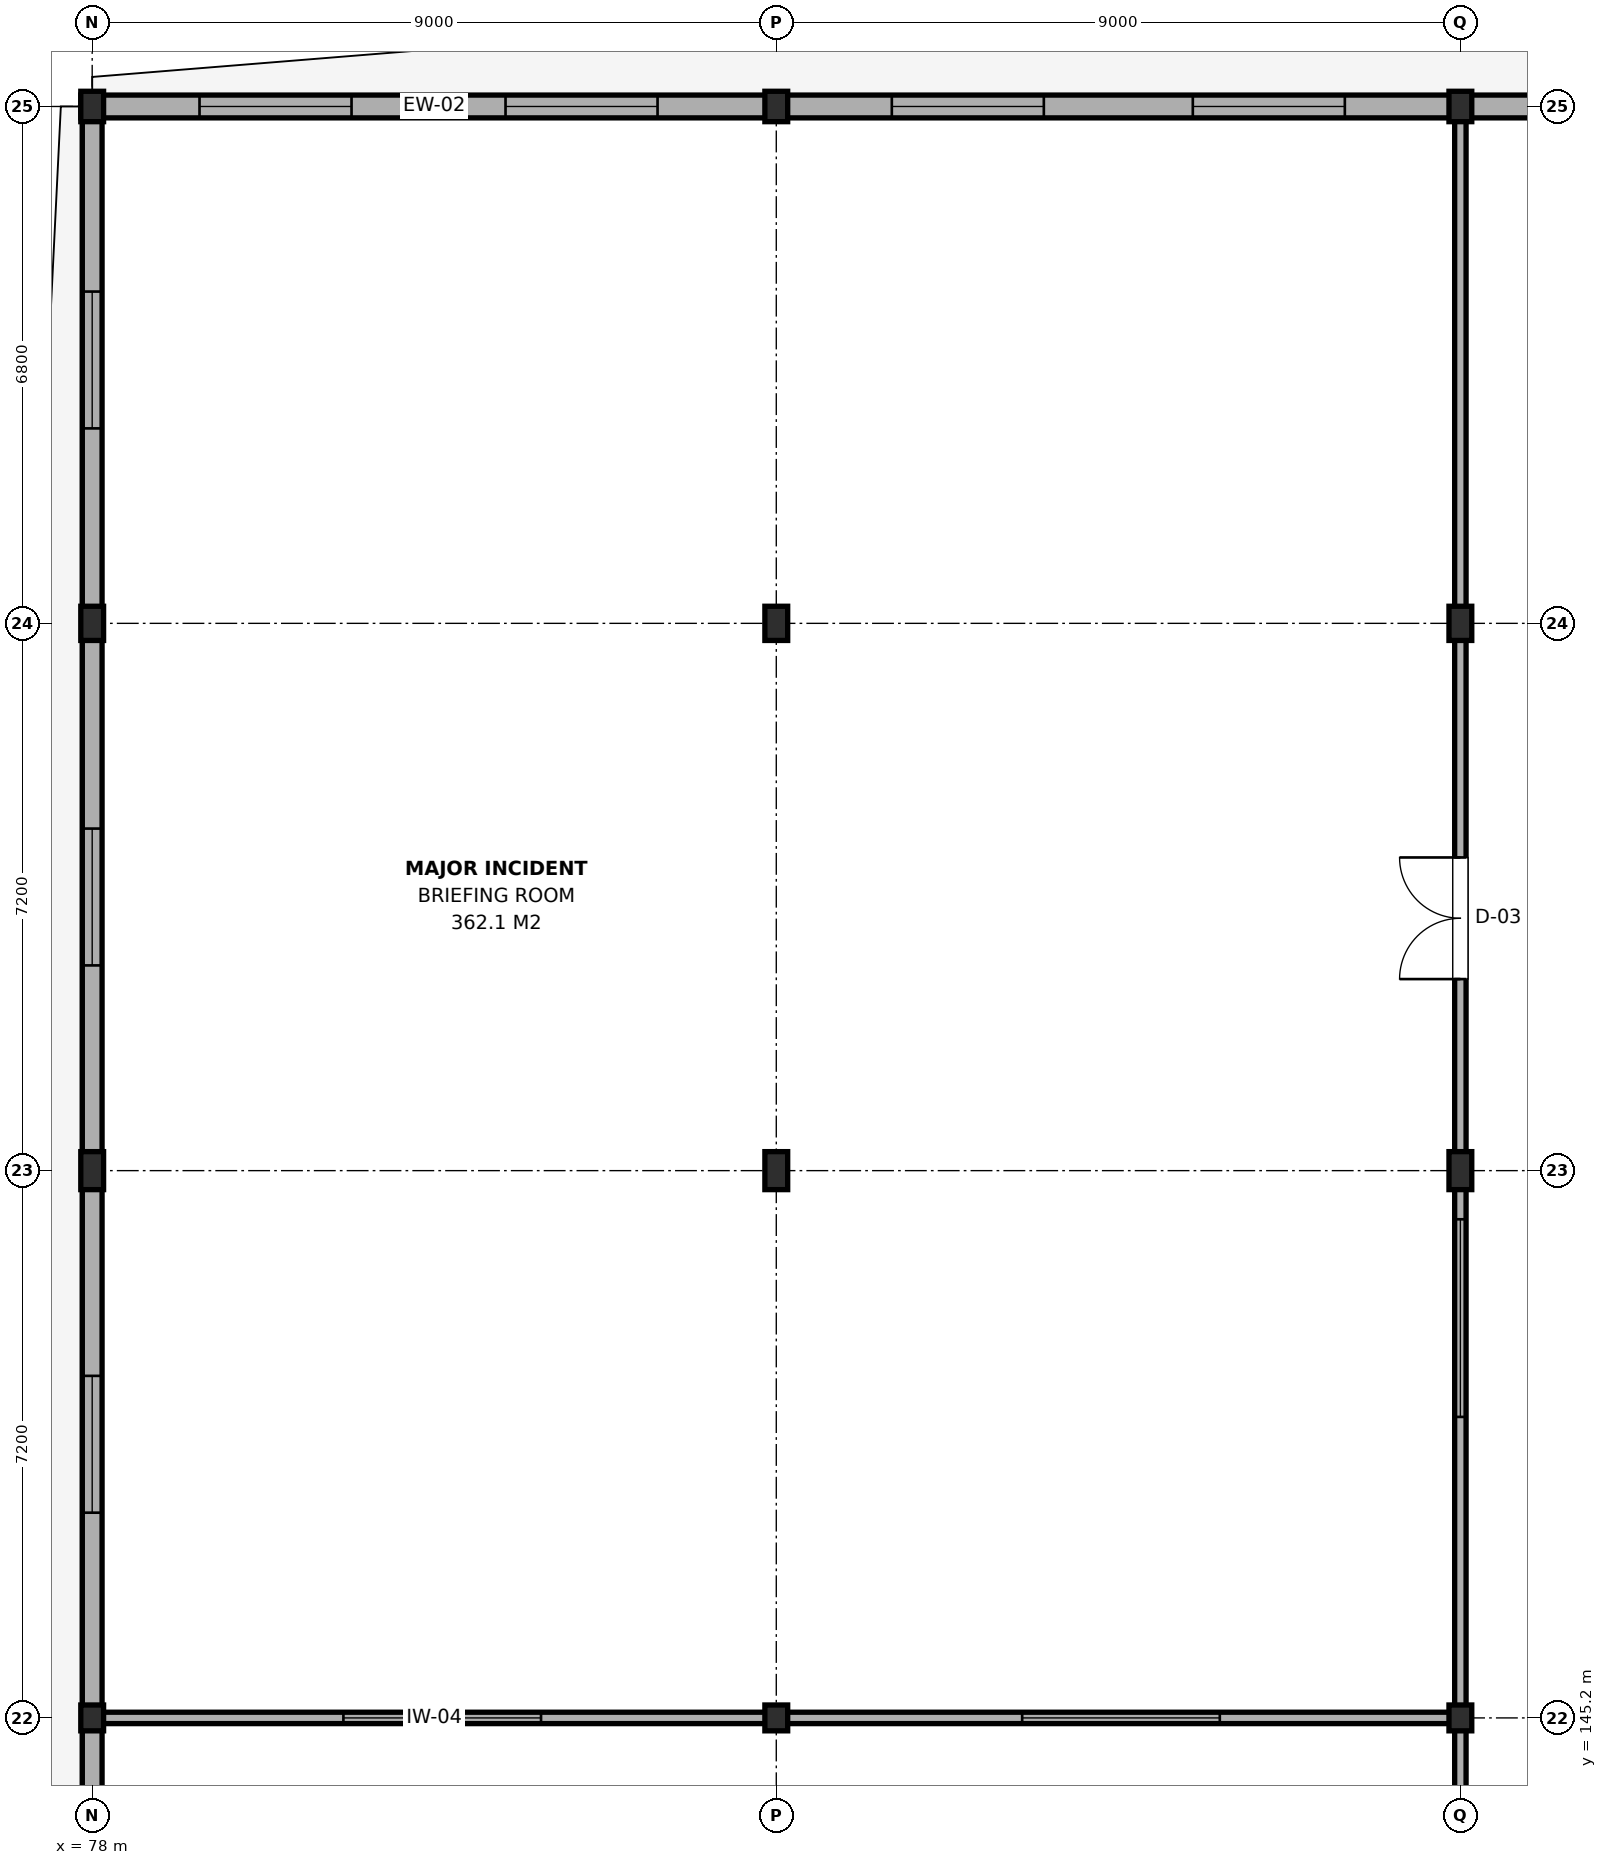
"""IFC4 building model, lengths in metres.
Left out: names, types, materials, properties, quantities, classifications, styles, units other than length and angle.
Written with IfcOpenShell. Run it as: python <this file> out.ifc"""

import sys

from ifc_helpers import new_model, si_unit, direction, frame, frame_2d, origin, origin_2d, place, context, subcontext, project, spatial, rectangle, i_section, extrude, element, fill, save


model = new_model("IFC4")
c1 = context("Model", 3, precision=1e-05, world=origin(), true_north=direction((0.0, 1.0)))
c2 = subcontext(c1, "Body", "Model", "MODEL_VIEW")
j1 = project(units=[si_unit("LENGTHUNIT", "METRE"), si_unit("PLANEANGLEUNIT", "RADIAN")], contexts=[c1])
p1 = place(None, origin())
s1 = spatial("IfcSite", under=j1, at=p1, CompositionType="ELEMENT")
p2 = place(p1, origin())
s2 = spatial("IfcBuilding", under=s1, at=p2, CompositionType="ELEMENT")
p3 = place(p2, frame((0.0, 0.0, 9.0)))
s3 = spatial("IfcBuildingStorey", under=s2, at=p3, CompositionType="ELEMENT", Elevation=9.0)
p4 = place(p3, frame((78.0, 145.2, 0.0), z_axis=(0.0, 0.0, 1.0), x_axis=(1.0, 0.0, 0.0)))
e1 = element("IfcColumn", 1, at=p4, inside=s3, PredefinedType="COLUMN", context=c2, shape_type="SweptSolid", body=[
    extrude(i_section(OverallWidth=0.3, OverallDepth=0.34, WebThickness=0.012, FlangeThickness=0.021, FilletRadius=0.027, at=origin_2d()), origin(), (0.0, 0.0, 1.0), 4.2),
])
p5 = place(p3, frame((78.0, 152.4, 0.0), z_axis=(0.0, 0.0, 1.0), x_axis=(1.0, 0.0, 0.0)))
e2 = element("IfcColumn", 2, at=p5, inside=s3, PredefinedType="COLUMN", context=c2, shape_type="SweptSolid", body=[
    extrude(i_section(OverallWidth=0.3, OverallDepth=0.5, WebThickness=0.014, FlangeThickness=0.028, FilletRadius=0.027, at=origin_2d()), origin(), (0.0, 0.0, 1.0), 4.2),
])
p6 = place(p3, frame((78.0, 159.6, 0.0), z_axis=(0.0, 0.0, 1.0), x_axis=(1.0, 0.0, 0.0)))
e3 = element("IfcColumn", 3, at=p6, inside=s3, PredefinedType="COLUMN", context=c2, shape_type="SweptSolid", body=[
    extrude(i_section(OverallWidth=0.3, OverallDepth=0.45, WebThickness=0.014, FlangeThickness=0.026, FilletRadius=0.027, at=origin_2d()), origin(), (0.0, 0.0, 1.0), 4.2),
])
p7 = place(p3, frame((78.0, 166.4, 0.0), z_axis=(0.0, 0.0, 1.0), x_axis=(1.0, 0.0, 0.0)))
e4 = element("IfcColumn", 4, at=p7, inside=s3, PredefinedType="COLUMN", context=c2, shape_type="SweptSolid", body=[
    extrude(i_section(OverallWidth=0.3, OverallDepth=0.4, WebThickness=0.013, FlangeThickness=0.024, FilletRadius=0.027, at=origin_2d()), origin(), (0.0, 0.0, 1.0), 4.2),
])
p8 = place(p3, frame((87.0, 145.2, 0.0), z_axis=(0.0, 0.0, 1.0), x_axis=(1.0, 0.0, 0.0)))
e5 = element("IfcColumn", 5, at=p8, inside=s3, PredefinedType="COLUMN", context=c2, shape_type="SweptSolid", body=[
    extrude(i_section(OverallWidth=0.3, OverallDepth=0.34, WebThickness=0.012, FlangeThickness=0.021, FilletRadius=0.027, at=origin_2d()), origin(), (0.0, 0.0, 1.0), 4.2),
])
p9 = place(p3, frame((87.0, 152.4, 0.0), z_axis=(0.0, 0.0, 1.0), x_axis=(1.0, 0.0, 0.0)))
e6 = element("IfcColumn", 6, at=p9, inside=s3, PredefinedType="COLUMN", context=c2, shape_type="SweptSolid", body=[
    extrude(i_section(OverallWidth=0.3, OverallDepth=0.5, WebThickness=0.014, FlangeThickness=0.028, FilletRadius=0.027, at=origin_2d()), origin(), (0.0, 0.0, 1.0), 4.2),
])
p10 = place(p3, frame((87.0, 159.6, 0.0), z_axis=(0.0, 0.0, 1.0), x_axis=(1.0, 0.0, 0.0)))
e7 = element("IfcColumn", 7, at=p10, inside=s3, PredefinedType="COLUMN", context=c2, shape_type="SweptSolid", body=[
    extrude(i_section(OverallWidth=0.3, OverallDepth=0.45, WebThickness=0.014, FlangeThickness=0.026, FilletRadius=0.027, at=origin_2d()), origin(), (0.0, 0.0, 1.0), 4.2),
])
p11 = place(p3, frame((87.0, 166.4, 0.0), z_axis=(0.0, 0.0, 1.0), x_axis=(1.0, 0.0, 0.0)))
e8 = element("IfcColumn", 8, at=p11, inside=s3, PredefinedType="COLUMN", context=c2, shape_type="SweptSolid", body=[
    extrude(i_section(OverallWidth=0.3, OverallDepth=0.4, WebThickness=0.013, FlangeThickness=0.024, FilletRadius=0.027, at=origin_2d()), origin(), (0.0, 0.0, 1.0), 4.2),
])
p12 = place(p3, frame((96.0, 145.2, 0.0), z_axis=(0.0, 0.0, 1.0), x_axis=(1.0, 0.0, 0.0)))
e9 = element("IfcColumn", 9, at=p12, inside=s3, PredefinedType="COLUMN", context=c2, shape_type="SweptSolid", body=[
    extrude(i_section(OverallWidth=0.3, OverallDepth=0.34, WebThickness=0.012, FlangeThickness=0.021, FilletRadius=0.027, at=origin_2d()), origin(), (0.0, 0.0, 1.0), 4.2),
])
p13 = place(p3, frame((96.0, 152.4, 0.0), z_axis=(0.0, 0.0, 1.0), x_axis=(1.0, 0.0, 0.0)))
e10 = element("IfcColumn", 10, at=p13, inside=s3, PredefinedType="COLUMN", context=c2, shape_type="SweptSolid", body=[
    extrude(i_section(OverallWidth=0.3, OverallDepth=0.5, WebThickness=0.014, FlangeThickness=0.028, FilletRadius=0.027, at=origin_2d()), origin(), (0.0, 0.0, 1.0), 4.2),
])
p14 = place(p3, frame((96.0, 159.6, 0.0), z_axis=(0.0, 0.0, 1.0), x_axis=(1.0, 0.0, 0.0)))
e11 = element("IfcColumn", 11, at=p14, inside=s3, PredefinedType="COLUMN", context=c2, shape_type="SweptSolid", body=[
    extrude(i_section(OverallWidth=0.3, OverallDepth=0.45, WebThickness=0.014, FlangeThickness=0.026, FilletRadius=0.027, at=origin_2d()), origin(), (0.0, 0.0, 1.0), 4.2),
])
p15 = place(p3, frame((96.0, 166.4, 0.0), z_axis=(0.0, 0.0, 1.0), x_axis=(1.0, 0.0, 0.0)))
e12 = element("IfcColumn", 12, at=p15, inside=s3, PredefinedType="COLUMN", context=c2, shape_type="SweptSolid", body=[
    extrude(i_section(OverallWidth=0.3, OverallDepth=0.4, WebThickness=0.013, FlangeThickness=0.024, FilletRadius=0.027, at=origin_2d()), origin(), (0.0, 0.0, 1.0), 4.2),
])
p16 = place(p3, frame((78.0, 138.0, 0.0), z_axis=(0.0, 0.0, 1.0), x_axis=(0.0, 1.0, 0.0)))
e13 = element("IfcWall", 13, at=p16, inside=s3, PredefinedType="SOLIDWALL", context=c2, shape_type="SweptSolid", body=[
    extrude(rectangle(XDim=7.2, YDim=0.26, at=frame_2d((3.6, 0.0))), origin(), (0.0, 0.0, 1.0), 3.375),
])
p17 = place(p16, frame((2.7, 0.0, 0.65)))
e14 = element("IfcOpeningElement", 14, at=p17, cuts=e13, PredefinedType="OPENING", context=c2, shape_type="SweptSolid", body=[
    extrude(rectangle(XDim=1.8, YDim=1.2, at=frame_2d((0.9, 0.6))), frame((0.0, 0.145, 0.0), z_axis=(0.0, -1.0, 0.0), x_axis=(1.0, 0.0, 0.0)), (0.0, 0.0, 1.0), 0.29),
])
p18 = place(p3, frame((78.0, 145.2, 0.0), z_axis=(0.0, 0.0, 1.0), x_axis=(0.0, 1.0, 0.0)))
e15 = element("IfcWall", 15, at=p18, inside=s3, PredefinedType="SOLIDWALL", context=c2, shape_type="SweptSolid", body=[
    extrude(rectangle(XDim=7.2, YDim=0.26, at=frame_2d((3.6, 0.0))), origin(), (0.0, 0.0, 1.0), 3.375),
])
p19 = place(p18, frame((2.7, 0.0, 0.65)))
e16 = element("IfcOpeningElement", 16, at=p19, cuts=e15, PredefinedType="OPENING", context=c2, shape_type="SweptSolid", body=[
    extrude(rectangle(XDim=1.8, YDim=1.2, at=frame_2d((0.9, 0.6))), frame((0.0, 0.145, 0.0), z_axis=(0.0, -1.0, 0.0), x_axis=(1.0, 0.0, 0.0)), (0.0, 0.0, 1.0), 0.29),
])
p20 = place(p3, frame((78.0, 152.4, 0.0), z_axis=(0.0, 0.0, 1.0), x_axis=(0.0, 1.0, 0.0)))
e17 = element("IfcWall", 17, at=p20, inside=s3, PredefinedType="SOLIDWALL", context=c2, shape_type="SweptSolid", body=[
    extrude(rectangle(XDim=7.2, YDim=0.26, at=frame_2d((3.6, 0.0))), origin(), (0.0, 0.0, 1.0), 3.375),
])
p21 = place(p20, frame((2.7, 0.0, 0.65)))
e18 = element("IfcOpeningElement", 18, at=p21, cuts=e17, PredefinedType="OPENING", context=c2, shape_type="SweptSolid", body=[
    extrude(rectangle(XDim=1.8, YDim=1.2, at=frame_2d((0.9, 0.6))), frame((0.0, 0.145, 0.0), z_axis=(0.0, -1.0, 0.0), x_axis=(1.0, 0.0, 0.0)), (0.0, 0.0, 1.0), 0.29),
])
p22 = place(p3, frame((78.0, 159.6, 0.0), z_axis=(0.0, 0.0, 1.0), x_axis=(0.0, 1.0, 0.0)))
e19 = element("IfcWall", 19, at=p22, inside=s3, PredefinedType="SOLIDWALL", context=c2, shape_type="SweptSolid", body=[
    extrude(rectangle(XDim=6.93, YDim=0.26, at=frame_2d((3.465, 0.0))), origin(), (0.0, 0.0, 1.0), 3.425),
])
p23 = place(p22, frame((2.565, 0.0, 0.65)))
e20 = element("IfcOpeningElement", 20, at=p23, cuts=e19, PredefinedType="OPENING", context=c2, shape_type="SweptSolid", body=[
    extrude(rectangle(XDim=1.8, YDim=1.2, at=frame_2d((0.9, 0.6))), frame((0.0, 0.145, 0.0), z_axis=(0.0, -1.0, 0.0), x_axis=(1.0, 0.0, 0.0)), (0.0, 0.0, 1.0), 0.29),
])
p24 = place(p3, frame((77.85, 166.4, 0.0), z_axis=(0.0, 0.0, 1.0), x_axis=(1.0, 0.0, 0.0)))
e21 = element("IfcWall", 21, at=p24, inside=s3, PredefinedType="SOLIDWALL", context=c2, shape_type="SweptSolid", body=[
    extrude(rectangle(XDim=9.15, YDim=0.3, at=frame_2d((4.575, 0.0))), origin(), (0.0, 0.0, 1.0), 3.435),
])
p25 = place(p24, frame((1.562, 0.0, 0.95)))
e22 = element("IfcOpeningElement", 22, at=p25, cuts=e21, PredefinedType="OPENING", context=c2, shape_type="SweptSolid", body=[
    extrude(rectangle(XDim=2.0, YDim=1.8, at=frame_2d((1.0, 0.9))), frame((0.0, 0.165, 0.0), z_axis=(0.0, -1.0, 0.0), x_axis=(1.0, 0.0, 0.0)), (0.0, 0.0, 1.0), 0.33),
])
p26 = place(p24, frame((5.588, 0.0, 0.95)))
e23 = element("IfcOpeningElement", 23, at=p26, cuts=e21, PredefinedType="OPENING", context=c2, shape_type="SweptSolid", body=[
    extrude(rectangle(XDim=2.0, YDim=1.8, at=frame_2d((1.0, 0.9))), frame((0.0, 0.165, 0.0), z_axis=(0.0, -1.0, 0.0), x_axis=(1.0, 0.0, 0.0)), (0.0, 0.0, 1.0), 0.33),
])
p27 = place(p3, frame((87.0, 166.4, 0.0), z_axis=(0.0, 0.0, 1.0), x_axis=(1.0, 0.0, 0.0)))
e24 = element("IfcWall", 24, at=p27, inside=s3, PredefinedType="SOLIDWALL", context=c2, shape_type="SweptSolid", body=[
    extrude(rectangle(XDim=9.0, YDim=0.3, at=frame_2d((4.5, 0.0))), origin(), (0.0, 0.0, 1.0), 3.435),
])
p28 = place(p27, frame((1.52, 0.0, 0.95)))
e25 = element("IfcOpeningElement", 25, at=p28, cuts=e24, PredefinedType="OPENING", context=c2, shape_type="SweptSolid", body=[
    extrude(rectangle(XDim=2.0, YDim=1.8, at=frame_2d((1.0, 0.9))), frame((0.0, 0.165, 0.0), z_axis=(0.0, -1.0, 0.0), x_axis=(1.0, 0.0, 0.0)), (0.0, 0.0, 1.0), 0.33),
])
p29 = place(p27, frame((5.48, 0.0, 0.95)))
e26 = element("IfcOpeningElement", 26, at=p29, cuts=e24, PredefinedType="OPENING", context=c2, shape_type="SweptSolid", body=[
    extrude(rectangle(XDim=2.0, YDim=1.8, at=frame_2d((1.0, 0.9))), frame((0.0, 0.165, 0.0), z_axis=(0.0, -1.0, 0.0), x_axis=(1.0, 0.0, 0.0)), (0.0, 0.0, 1.0), 0.33),
])
p30 = place(p3, frame((96.0, 166.4, 0.0), z_axis=(0.0, 0.0, 1.0), x_axis=(1.0, 0.0, 0.0)))
e27 = element("IfcWall", 27, at=p30, inside=s3, PredefinedType="SOLIDWALL", context=c2, shape_type="SweptSolid", body=[
    extrude(rectangle(XDim=9.0, YDim=0.3, at=frame_2d((4.5, 0.0))), origin(), (0.0, 0.0, 1.0), 3.485),
])
p31 = place(p3, frame((96.0, 122.4, 0.0), z_axis=(0.0, 0.0, 1.0), x_axis=(0.0, 1.0, 0.0)))
e28 = element("IfcWall", 28, at=p31, inside=s3, PredefinedType="PARTITIONING", context=c2, shape_type="SweptSolid", body=[
    extrude(rectangle(XDim=22.8, YDim=0.15, at=frame_2d((11.4, 0.0))), origin(), (0.0, 0.0, 1.0), 3.375),
])
p32 = place(p31, frame((10.65, 0.0, 0.0)))
e29 = element("IfcOpeningElement", 29, at=p32, cuts=e28, PredefinedType="OPENING", context=c2, shape_type="SweptSolid", body=[
    extrude(rectangle(XDim=1.5, YDim=2.15, at=frame_2d((0.75, 1.075))), frame((0.0, 0.09, 0.0), z_axis=(0.0, -1.0, 0.0), x_axis=(1.0, 0.0, 0.0)), (0.0, 0.0, 1.0), 0.18),
])
p33 = place(p31, frame((4.4, 0.0, 0.95)))
e30 = element("IfcOpeningElement", 30, at=p33, cuts=e28, PredefinedType="OPENING", context=c2, shape_type="SweptSolid", body=[
    extrude(rectangle(XDim=2.6, YDim=1.5, at=frame_2d((1.3, 0.75))), frame((0.0, 0.09, 0.0), z_axis=(0.0, -1.0, 0.0), x_axis=(1.0, 0.0, 0.0)), (0.0, 0.0, 1.0), 0.18),
])
p34 = place(p3, frame((96.0, 145.2, 0.0), z_axis=(0.0, 0.0, 1.0), x_axis=(0.0, 1.0, 0.0)))
e31 = element("IfcWall", 31, at=p34, inside=s3, PredefinedType="PARTITIONING", context=c2, shape_type="SweptSolid", body=[
    extrude(rectangle(XDim=21.04, YDim=0.15, at=frame_2d((10.52, 0.0))), origin(), (0.0, 0.0, 1.0), 3.375),
])
p35 = place(p34, frame((9.72, 0.0, 0.0)))
e32 = element("IfcOpeningElement", 32, at=p35, cuts=e31, PredefinedType="OPENING", context=c2, shape_type="SweptSolid", body=[
    extrude(rectangle(XDim=1.6, YDim=2.15, at=frame_2d((0.8, 1.075))), frame((0.0, 0.09, 0.0), z_axis=(0.0, -1.0, 0.0), x_axis=(1.0, 0.0, 0.0)), (0.0, 0.0, 1.0), 0.18),
])
p36 = place(p34, frame((3.96, 0.0, 0.95)))
e33 = element("IfcOpeningElement", 33, at=p36, cuts=e31, PredefinedType="OPENING", context=c2, shape_type="SweptSolid", body=[
    extrude(rectangle(XDim=2.6, YDim=1.5, at=frame_2d((1.3, 0.75))), frame((0.0, 0.09, 0.0), z_axis=(0.0, -1.0, 0.0), x_axis=(1.0, 0.0, 0.0)), (0.0, 0.0, 1.0), 0.18),
])
p37 = place(p3, frame((78.14, 145.2, 0.0), z_axis=(0.0, 0.0, 1.0), x_axis=(1.0, 0.0, 0.0)))
e34 = element("IfcWall", 34, at=p37, inside=s3, PredefinedType="PARTITIONING", context=c2, shape_type="SweptSolid", body=[
    extrude(rectangle(XDim=17.86, YDim=0.15, at=frame_2d((8.93, 0.0))), origin(), (0.0, 0.0, 1.0), 3.435),
])
p38 = place(p37, frame((3.165, 0.0, 0.95)))
e35 = element("IfcOpeningElement", 35, at=p38, cuts=e34, PredefinedType="OPENING", context=c2, shape_type="SweptSolid", body=[
    extrude(rectangle(XDim=2.6, YDim=1.5, at=frame_2d((1.3, 0.75))), frame((0.0, 0.09, 0.0), z_axis=(0.0, -1.0, 0.0), x_axis=(1.0, 0.0, 0.0)), (0.0, 0.0, 1.0), 0.18),
])
p39 = place(p37, frame((12.095, 0.0, 0.95)))
e36 = element("IfcOpeningElement", 36, at=p39, cuts=e34, PredefinedType="OPENING", context=c2, shape_type="SweptSolid", body=[
    extrude(rectangle(XDim=2.6, YDim=1.5, at=frame_2d((1.3, 0.75))), frame((0.0, 0.09, 0.0), z_axis=(0.0, -1.0, 0.0), x_axis=(1.0, 0.0, 0.0)), (0.0, 0.0, 1.0), 0.18),
])
p40 = place(p19, origin())
e37 = element("IfcWindow", 37, at=p40, inside=s3, PartitioningType="SINGLE_PANEL", PredefinedType="WINDOW", context=c2, shape_type="SweptSolid", body=[
    extrude(rectangle(XDim=1.8, YDim=1.2, at=frame_2d((0.9, 0.6))), frame((0.0, 0.03, 0.0), z_axis=(0.0, -1.0, 0.0), x_axis=(1.0, 0.0, 0.0)), (0.0, 0.0, 1.0), 0.06),
])
fill(e16, e37)
p41 = place(p21, origin())
e38 = element("IfcWindow", 38, at=p41, inside=s3, PartitioningType="SINGLE_PANEL", PredefinedType="WINDOW", context=c2, shape_type="SweptSolid", body=[
    extrude(rectangle(XDim=1.8, YDim=1.2, at=frame_2d((0.9, 0.6))), frame((0.0, 0.03, 0.0), z_axis=(0.0, -1.0, 0.0), x_axis=(1.0, 0.0, 0.0)), (0.0, 0.0, 1.0), 0.06),
])
fill(e18, e38)
p42 = place(p23, origin())
e39 = element("IfcWindow", 39, at=p42, inside=s3, PartitioningType="SINGLE_PANEL", PredefinedType="WINDOW", context=c2, shape_type="SweptSolid", body=[
    extrude(rectangle(XDim=1.8, YDim=1.2, at=frame_2d((0.9, 0.6))), frame((0.0, 0.03, 0.0), z_axis=(0.0, -1.0, 0.0), x_axis=(1.0, 0.0, 0.0)), (0.0, 0.0, 1.0), 0.06),
])
fill(e20, e39)
p43 = place(p25, origin())
e40 = element("IfcWindow", 40, at=p43, inside=s3, PartitioningType="SINGLE_PANEL", PredefinedType="WINDOW", context=c2, shape_type="SweptSolid", body=[
    extrude(rectangle(XDim=2.0, YDim=1.8, at=frame_2d((1.0, 0.9))), frame((0.0, 0.03, 0.0), z_axis=(0.0, -1.0, 0.0), x_axis=(1.0, 0.0, 0.0)), (0.0, 0.0, 1.0), 0.06),
])
fill(e22, e40)
p44 = place(p26, origin())
e41 = element("IfcWindow", 41, at=p44, inside=s3, PartitioningType="SINGLE_PANEL", PredefinedType="WINDOW", context=c2, shape_type="SweptSolid", body=[
    extrude(rectangle(XDim=2.0, YDim=1.8, at=frame_2d((1.0, 0.9))), frame((0.0, 0.03, 0.0), z_axis=(0.0, -1.0, 0.0), x_axis=(1.0, 0.0, 0.0)), (0.0, 0.0, 1.0), 0.06),
])
fill(e23, e41)
p45 = place(p28, origin())
e42 = element("IfcWindow", 42, at=p45, inside=s3, PartitioningType="SINGLE_PANEL", PredefinedType="WINDOW", context=c2, shape_type="SweptSolid", body=[
    extrude(rectangle(XDim=2.0, YDim=1.8, at=frame_2d((1.0, 0.9))), frame((0.0, 0.03, 0.0), z_axis=(0.0, -1.0, 0.0), x_axis=(1.0, 0.0, 0.0)), (0.0, 0.0, 1.0), 0.06),
])
fill(e25, e42)
p46 = place(p29, origin())
e43 = element("IfcWindow", 43, at=p46, inside=s3, PartitioningType="SINGLE_PANEL", PredefinedType="WINDOW", context=c2, shape_type="SweptSolid", body=[
    extrude(rectangle(XDim=2.0, YDim=1.8, at=frame_2d((1.0, 0.9))), frame((0.0, 0.03, 0.0), z_axis=(0.0, -1.0, 0.0), x_axis=(1.0, 0.0, 0.0)), (0.0, 0.0, 1.0), 0.06),
])
fill(e26, e43)
p47 = place(p35, origin())
e44 = element("IfcDoor", 44, at=p47, inside=s3, OperationType="DOUBLE_DOOR_SINGLE_SWING", PredefinedType="DOOR", context=c2, shape_type="SweptSolid", body=[
    extrude(rectangle(XDim=1.6, YDim=2.15, at=frame_2d((0.8, 1.075))), frame((0.0, 0.025, 0.0), z_axis=(0.0, -1.0, 0.0), x_axis=(1.0, 0.0, 0.0)), (0.0, 0.0, 1.0), 0.05),
])
fill(e32, e44)
p48 = place(p36, origin())
e45 = element("IfcWindow", 45, at=p48, inside=s3, PartitioningType="SINGLE_PANEL", PredefinedType="WINDOW", context=c2, shape_type="SweptSolid", body=[
    extrude(rectangle(XDim=2.6, YDim=1.5, at=frame_2d((1.3, 0.75))), frame((0.0, 0.03, 0.0), z_axis=(0.0, -1.0, 0.0), x_axis=(1.0, 0.0, 0.0)), (0.0, 0.0, 1.0), 0.06),
])
fill(e33, e45)
p49 = place(p38, origin())
e46 = element("IfcWindow", 46, at=p49, inside=s3, PartitioningType="SINGLE_PANEL", PredefinedType="WINDOW", context=c2, shape_type="SweptSolid", body=[
    extrude(rectangle(XDim=2.6, YDim=1.5, at=frame_2d((1.3, 0.75))), frame((0.0, 0.03, 0.0), z_axis=(0.0, -1.0, 0.0), x_axis=(1.0, 0.0, 0.0)), (0.0, 0.0, 1.0), 0.06),
])
fill(e35, e46)
p50 = place(p39, origin())
e47 = element("IfcWindow", 47, at=p50, inside=s3, PartitioningType="SINGLE_PANEL", PredefinedType="WINDOW", context=c2, shape_type="SweptSolid", body=[
    extrude(rectangle(XDim=2.6, YDim=1.5, at=frame_2d((1.3, 0.75))), frame((0.0, 0.03, 0.0), z_axis=(0.0, -1.0, 0.0), x_axis=(1.0, 0.0, 0.0)), (0.0, 0.0, 1.0), 0.06),
])
fill(e36, e47)
save(model, sys.argv[1])
